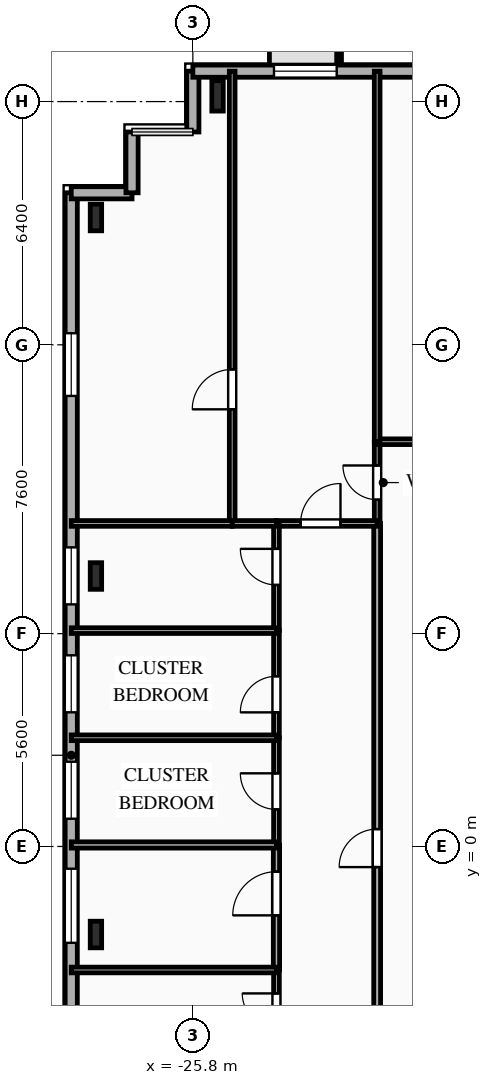
"""IFC4 building model, lengths in metres.
Left out: names, types, materials, properties, quantities, classifications, styles, units other than length and angle.
Written with IfcOpenShell. Run it as: python <this file> out.ifc"""

import sys

from ifc_helpers import new_model, si_unit, direction, frame, frame_2d, origin, origin_2d, place, context, subcontext, project, spatial, rectangle, i_section, extrude, element, fill, save


model = new_model("IFC4")
c1 = context("Model", 3, precision=1e-05, world=origin(), true_north=direction((0.0, 1.0)))
c2 = subcontext(c1, "Body", "Model", "MODEL_VIEW")
j1 = project(units=[si_unit("LENGTHUNIT", "METRE"), si_unit("PLANEANGLEUNIT", "RADIAN")], contexts=[c1])
p1 = place(None, origin())
s1 = spatial("IfcSite", under=j1, at=p1, CompositionType="ELEMENT")
p2 = place(p1, origin())
s2 = spatial("IfcBuilding", under=s1, at=p2, CompositionType="ELEMENT")
p3 = place(p2, frame((0.0, 0.0, 137.7)))
s3 = spatial("IfcBuildingStorey", under=s2, at=p3, CompositionType="ELEMENT", Elevation=137.7)
p4 = place(p3, frame((-25.15, 19.75, 0.0), z_axis=(0.0, 0.0, 1.0), x_axis=(1.0, 0.0, 0.0)))
e1 = element("IfcColumn", 1, at=p4, inside=s3, PredefinedType="COLUMN", context=c2, shape_type="SweptSolid", body=[
    extrude(i_section(OverallWidth=0.3, OverallDepth=0.8, WebThickness=0.018, FlangeThickness=0.033, FilletRadius=0.03, at=origin_2d()), origin(), (0.0, 0.0, 1.0), 3.35),
])
for number, where, z_axis, x_axis in (
    (2, (-28.35, 16.55, 0.0), (0.0, 0.0, 1.0), (1.0, 0.0, 0.0)),
    (3, (-28.35, 7.117, 0.0), (0.0, 0.0, 1.0), (1.0, 0.0, 0.0)),
    (4, (-28.35, -2.317, 0.0), (0.0, 0.0, 1.0), (1.0, 0.0, 0.0)),
):
    element("IfcColumn", number, at=place(p3, frame(where, z_axis=z_axis, x_axis=x_axis)), inside=s3, PredefinedType="COLUMN", context=c2, shape_type="SweptSolid", body=[
        extrude(i_section(OverallWidth=0.3, OverallDepth=0.7, WebThickness=0.017, FlangeThickness=0.032, FilletRadius=0.027, at=origin_2d()), origin(), (0.0, 0.0, 1.0), 3.35),
    ])
p5 = place(p3, frame((-29.0, -12.4, 0.0), z_axis=(0.0, 0.0, 1.0), x_axis=(0.0, 1.0, 0.0)))
e5 = element("IfcWall", 5, at=p5, inside=s3, PredefinedType="SOLIDWALL", context=c2, shape_type="SweptSolid", body=[
    extrude(rectangle(XDim=29.6, YDim=0.32, at=frame_2d((14.8, 0.0))), origin(), (0.0, 0.0, 1.0), 3.04),
])
p6 = place(p5, frame((2.855, 0.0, 0.85)))
e6 = element("IfcOpeningElement", 6, at=p6, cuts=e5, PredefinedType="OPENING", context=c2, shape_type="SweptSolid", body=[
    extrude(rectangle(XDim=1.65, YDim=1.85, at=frame_2d((0.825, 0.925))), frame((0.0, 0.17, 0.0), z_axis=(0.0, -1.0, 0.0), x_axis=(1.0, 0.0, 0.0)), (0.0, 0.0, 1.0), 0.34),
])
p7 = place(p5, frame((9.865, 0.0, 0.85)))
e7 = element("IfcOpeningElement", 7, at=p7, cuts=e5, PredefinedType="OPENING", context=c2, shape_type="SweptSolid", body=[
    extrude(rectangle(XDim=1.95, YDim=1.85, at=frame_2d((0.975, 0.925))), frame((0.0, 0.17, 0.0), z_axis=(0.0, -1.0, 0.0), x_axis=(1.0, 0.0, 0.0)), (0.0, 0.0, 1.0), 0.34),
])
p8 = place(p5, frame((13.13, 0.0, 0.85)))
e8 = element("IfcOpeningElement", 8, at=p8, cuts=e5, PredefinedType="OPENING", context=c2, shape_type="SweptSolid", body=[
    extrude(rectangle(XDim=1.5, YDim=1.85, at=frame_2d((0.75, 0.925))), frame((0.0, 0.17, 0.0), z_axis=(0.0, -1.0, 0.0), x_axis=(1.0, 0.0, 0.0)), (0.0, 0.0, 1.0), 0.34),
])
p9 = place(p5, frame((15.93, 0.0, 0.85)))
e9 = element("IfcOpeningElement", 9, at=p9, cuts=e5, PredefinedType="OPENING", context=c2, shape_type="SweptSolid", body=[
    extrude(rectangle(XDim=1.5, YDim=1.85, at=frame_2d((0.75, 0.925))), frame((0.0, 0.17, 0.0), z_axis=(0.0, -1.0, 0.0), x_axis=(1.0, 0.0, 0.0)), (0.0, 0.0, 1.0), 0.34),
])
p10 = place(p5, frame((18.77, 0.0, 0.85)))
e10 = element("IfcOpeningElement", 10, at=p10, cuts=e5, PredefinedType="OPENING", context=c2, shape_type="SweptSolid", body=[
    extrude(rectangle(XDim=1.5, YDim=1.85, at=frame_2d((0.75, 0.925))), frame((0.0, 0.17, 0.0), z_axis=(0.0, -1.0, 0.0), x_axis=(1.0, 0.0, 0.0)), (0.0, 0.0, 1.0), 0.34),
])
p11 = place(p5, frame((24.255, 0.0, 0.85)))
e11 = element("IfcOpeningElement", 11, at=p11, cuts=e5, PredefinedType="OPENING", context=c2, shape_type="SweptSolid", body=[
    extrude(rectangle(XDim=1.65, YDim=1.85, at=frame_2d((0.825, 0.925))), frame((0.0, 0.17, 0.0), z_axis=(0.0, -1.0, 0.0), x_axis=(1.0, 0.0, 0.0)), (0.0, 0.0, 1.0), 0.34),
])
for number, where, z_axis, x_axis in (
    (12, (-29.0, 17.2, 0.0), (0.0, 0.0, 1.0), (1.0, 0.0, 0.0)),
    (13, (-27.4, 17.2, 0.0), (0.0, 0.0, 1.0), (0.0, 1.0, 0.0)),
):
    element("IfcWall", number, at=place(p3, frame(where, z_axis=z_axis, x_axis=x_axis)), inside=s3, PredefinedType="SOLIDWALL", context=c2, shape_type="SweptSolid", body=[
        extrude(rectangle(XDim=1.6, YDim=0.32, at=frame_2d((0.8, 0.0))), origin(), (0.0, 0.0, 1.0), 3.04),
    ])
p12 = place(p3, frame((-25.8, 18.8, 0.0), z_axis=(0.0, 0.0, 1.0), x_axis=(0.0, 1.0, 0.0)))
e14 = element("IfcWall", 14, at=p12, inside=s3, PredefinedType="SOLIDWALL", context=c2, shape_type="SweptSolid", body=[
    extrude(rectangle(XDim=1.6, YDim=0.32, at=frame_2d((0.8, 0.0))), origin(), (0.0, 0.0, 1.0), 3.04),
])
p13 = place(p3, frame((-25.8, 20.4, 0.0), z_axis=(0.0, 0.0, 1.0), x_axis=(1.0, 0.0, 0.0)))
e15 = element("IfcWall", 15, at=p13, inside=s3, PredefinedType="SOLIDWALL", context=c2, shape_type="SweptSolid", body=[
    extrude(rectangle(XDim=49.6, YDim=0.32, at=frame_2d((24.8, 0.0))), origin(), (0.0, 0.0, 1.0), 3.04),
])
p14 = place(p13, frame((2.135, 0.0, 0.85)))
e16 = element("IfcOpeningElement", 16, at=p14, cuts=e15, PredefinedType="OPENING", context=c2, shape_type="SweptSolid", body=[
    extrude(rectangle(XDim=1.65, YDim=1.85, at=frame_2d((0.825, 0.925))), frame((0.0, 0.17, 0.0), z_axis=(0.0, -1.0, 0.0), x_axis=(1.0, 0.0, 0.0)), (0.0, 0.0, 1.0), 0.34),
])
p15 = place(p13, frame((6.706, 0.0, 0.85)))
e17 = element("IfcOpeningElement", 17, at=p15, cuts=e15, PredefinedType="OPENING", context=c2, shape_type="SweptSolid", body=[
    extrude(rectangle(XDim=1.65, YDim=1.85, at=frame_2d((0.825, 0.925))), frame((0.0, 0.17, 0.0), z_axis=(0.0, -1.0, 0.0), x_axis=(1.0, 0.0, 0.0)), (0.0, 0.0, 1.0), 0.34),
])
p16 = place(p13, frame((14.81, 0.0, 0.85)))
e18 = element("IfcOpeningElement", 18, at=p16, cuts=e15, PredefinedType="OPENING", context=c2, shape_type="SweptSolid", body=[
    extrude(rectangle(XDim=1.5, YDim=1.85, at=frame_2d((0.75, 0.925))), frame((0.0, 0.17, 0.0), z_axis=(0.0, -1.0, 0.0), x_axis=(1.0, 0.0, 0.0)), (0.0, 0.0, 1.0), 0.34),
])
p17 = place(p13, frame((19.26, 0.0, 0.85)))
e19 = element("IfcOpeningElement", 19, at=p17, cuts=e15, PredefinedType="OPENING", context=c2, shape_type="SweptSolid", body=[
    extrude(rectangle(XDim=2.2, YDim=1.85, at=frame_2d((1.1, 0.925))), frame((0.0, 0.17, 0.0), z_axis=(0.0, -1.0, 0.0), x_axis=(1.0, 0.0, 0.0)), (0.0, 0.0, 1.0), 0.34),
])
p18 = place(p13, frame((25.26, 0.0, 0.85)))
e20 = element("IfcOpeningElement", 20, at=p18, cuts=e15, PredefinedType="OPENING", context=c2, shape_type="SweptSolid", body=[
    extrude(rectangle(XDim=2.2, YDim=1.85, at=frame_2d((1.1, 0.925))), frame((0.0, 0.17, 0.0), z_axis=(0.0, -1.0, 0.0), x_axis=(1.0, 0.0, 0.0)), (0.0, 0.0, 1.0), 0.34),
])
p19 = place(p13, frame((30.4, 0.0, 0.85)))
e21 = element("IfcOpeningElement", 21, at=p19, cuts=e15, PredefinedType="OPENING", context=c2, shape_type="SweptSolid", body=[
    extrude(rectangle(XDim=2.2, YDim=1.85, at=frame_2d((1.1, 0.925))), frame((0.0, 0.17, 0.0), z_axis=(0.0, -1.0, 0.0), x_axis=(1.0, 0.0, 0.0)), (0.0, 0.0, 1.0), 0.34),
])
p20 = place(p13, frame((37.18, 0.0, 0.85)))
e22 = element("IfcOpeningElement", 22, at=p20, cuts=e15, PredefinedType="OPENING", context=c2, shape_type="SweptSolid", body=[
    extrude(rectangle(XDim=2.2, YDim=1.85, at=frame_2d((1.1, 0.925))), frame((0.0, 0.17, 0.0), z_axis=(0.0, -1.0, 0.0), x_axis=(1.0, 0.0, 0.0)), (0.0, 0.0, 1.0), 0.34),
])
p21 = place(p13, frame((43.215, 0.0, 0.85)))
e23 = element("IfcOpeningElement", 23, at=p21, cuts=e15, PredefinedType="OPENING", context=c2, shape_type="SweptSolid", body=[
    extrude(rectangle(XDim=1.65, YDim=1.85, at=frame_2d((0.825, 0.925))), frame((0.0, 0.17, 0.0), z_axis=(0.0, -1.0, 0.0), x_axis=(1.0, 0.0, 0.0)), (0.0, 0.0, 1.0), 0.34),
])
p22 = place(p13, frame((47.45, 0.0, 0.85)))
e24 = element("IfcOpeningElement", 24, at=p22, cuts=e15, PredefinedType="OPENING", context=c2, shape_type="SweptSolid", body=[
    extrude(rectangle(XDim=1.1, YDim=1.85, at=frame_2d((0.55, 0.925))), frame((0.0, 0.17, 0.0), z_axis=(0.0, -1.0, 0.0), x_axis=(1.0, 0.0, 0.0)), (0.0, 0.0, 1.0), 0.34),
])
p23 = place(p3, frame((-20.95, 8.5, 0.0), z_axis=(0.0, 0.0, 1.0), x_axis=(0.0, 1.0, 0.0)))
e25 = element("IfcWall", 25, at=p23, inside=s3, PredefinedType="PARTITIONING", context=c2, shape_type="SweptSolid", body=[
    extrude(rectangle(XDim=2.15, YDim=0.15, at=frame_2d((1.075, 0.0))), origin(), (0.0, 0.0, 1.0), 3.04),
])
p24 = place(p23, frame((0.625, 0.0, 0.0)))
e26 = element("IfcOpeningElement", 26, at=p24, cuts=e25, PredefinedType="OPENING", context=c2, shape_type="SweptSolid", body=[
    extrude(rectangle(XDim=0.9, YDim=2.1, at=frame_2d((0.45, 1.05))), frame((0.0, 0.085, 0.0), z_axis=(0.0, -1.0, 0.0), x_axis=(1.0, 0.0, 0.0)), (0.0, 0.0, 1.0), 0.17),
])
p25 = place(p3, frame((-20.95, 10.65, 0.0), z_axis=(0.0, 0.0, 1.0), x_axis=(1.0, 0.0, 0.0)))
e27 = element("IfcWall", 27, at=p25, inside=s3, PredefinedType="PARTITIONING", context=c2, shape_type="SweptSolid", body=[
    extrude(rectangle(XDim=6.486, YDim=0.15, at=frame_2d((3.243, 0.0))), origin(), (0.0, 0.0, 1.0), 3.04),
])
p26 = place(p25, frame((4.322, 0.0, 0.0)))
e28 = element("IfcOpeningElement", 28, at=p26, cuts=e27, PredefinedType="OPENING", context=c2, shape_type="SweptSolid", body=[
    extrude(rectangle(XDim=1.05, YDim=2.15, at=frame_2d((0.525, 1.075))), frame((0.0, 0.085, 0.0), z_axis=(0.0, -1.0, 0.0), x_axis=(1.0, 0.0, 0.0)), (0.0, 0.0, 1.0), 0.17),
])
p27 = place(p3, frame((-20.95, -5.6, 0.0), z_axis=(0.0, 0.0, 1.0), x_axis=(0.0, 1.0, 0.0)))
e29 = element("IfcWall", 29, at=p27, inside=s3, PredefinedType="PARTITIONING", context=c2, shape_type="SweptSolid", body=[
    extrude(rectangle(XDim=14.1, YDim=0.18, at=frame_2d((7.05, 0.0))), origin(), (0.0, 0.0, 1.0), 3.04),
])
p28 = place(p27, frame((5.058, 0.0, 0.0)))
e30 = element("IfcOpeningElement", 30, at=p28, cuts=e29, PredefinedType="OPENING", context=c2, shape_type="SweptSolid", body=[
    extrude(rectangle(XDim=1.0, YDim=2.15, at=frame_2d((0.5, 1.075))), frame((0.0, 0.1, 0.0), z_axis=(0.0, -1.0, 0.0), x_axis=(1.0, 0.0, 0.0)), (0.0, 0.0, 1.0), 0.2),
])
p29 = place(p3, frame((-23.6, 8.5, 0.0), z_axis=(0.0, 0.0, 1.0), x_axis=(1.0, 0.0, 0.0)))
e31 = element("IfcWall", 31, at=p29, inside=s3, PredefinedType="PARTITIONING", context=c2, shape_type="SweptSolid", body=[
    extrude(rectangle(XDim=2.65, YDim=0.15, at=frame_2d((1.325, 0.0))), origin(), (0.0, 0.0, 1.0), 3.04),
])
p30 = place(p29, frame((0.635, 0.0, 0.0)))
e32 = element("IfcOpeningElement", 32, at=p30, cuts=e31, PredefinedType="OPENING", context=c2, shape_type="SweptSolid", body=[
    extrude(rectangle(XDim=1.05, YDim=2.15, at=frame_2d((0.525, 1.075))), frame((0.0, 0.085, 0.0), z_axis=(0.0, -1.0, 0.0), x_axis=(1.0, 0.0, 0.0)), (0.0, 0.0, 1.0), 0.17),
])
p31 = place(p3, frame((-23.6, -5.6, 0.0), z_axis=(0.0, 0.0, 1.0), x_axis=(0.0, 1.0, 0.0)))
e33 = element("IfcWall", 33, at=p31, inside=s3, PredefinedType="PLUMBINGWALL", context=c2, shape_type="SweptSolid", body=[
    extrude(rectangle(XDim=2.35, YDim=0.15, at=frame_2d((1.175, 0.0))), origin(), (0.0, 0.0, 1.0), 2.695),
])
p32 = place(p31, frame((0.834, 0.0, 0.0)))
e34 = element("IfcOpeningElement", 34, at=p32, cuts=e33, PredefinedType="OPENING", context=c2, shape_type="SweptSolid", body=[
    extrude(rectangle(XDim=0.9, YDim=2.1, at=frame_2d((0.45, 1.05))), frame((0.0, 0.085, 0.0), z_axis=(0.0, -1.0, 0.0), x_axis=(1.0, 0.0, 0.0)), (0.0, 0.0, 1.0), 0.17),
])
p33 = place(p3, frame((-23.6, -3.25, 0.0), z_axis=(0.0, 0.0, 1.0), x_axis=(0.0, 1.0, 0.0)))
e35 = element("IfcWall", 35, at=p33, inside=s3, PredefinedType="PARTITIONING", context=c2, shape_type="SweptSolid", body=[
    extrude(rectangle(XDim=3.29, YDim=0.165, at=frame_2d((1.645, 0.0))), origin(), (0.0, 0.0, 1.0), 2.695),
])
p34 = place(p33, frame((1.438, 0.0, 0.0)))
e36 = element("IfcOpeningElement", 36, at=p34, cuts=e35, PredefinedType="OPENING", context=c2, shape_type="SweptSolid", body=[
    extrude(rectangle(XDim=1.15, YDim=2.15, at=frame_2d((0.575, 1.075))), frame((0.0, 0.093, 0.0), z_axis=(0.0, -1.0, 0.0), x_axis=(1.0, 0.0, 0.0)), (0.0, 0.0, 1.0), 0.185),
])
p35 = place(p3, frame((-23.6, 0.04, 0.0), z_axis=(0.0, 0.0, 1.0), x_axis=(0.0, 1.0, 0.0)))
e37 = element("IfcWall", 37, at=p35, inside=s3, PredefinedType="PARTITIONING", context=c2, shape_type="SweptSolid", body=[
    extrude(rectangle(XDim=2.82, YDim=0.15, at=frame_2d((1.41, 0.0))), origin(), (0.0, 0.0, 1.0), 2.695),
])
p36 = place(p35, frame((0.935, 0.0, 0.0)))
e38 = element("IfcOpeningElement", 38, at=p36, cuts=e37, PredefinedType="OPENING", context=c2, shape_type="SweptSolid", body=[
    extrude(rectangle(XDim=0.95, YDim=2.1, at=frame_2d((0.475, 1.05))), frame((0.0, 0.085, 0.0), z_axis=(0.0, -1.0, 0.0), x_axis=(1.0, 0.0, 0.0)), (0.0, 0.0, 1.0), 0.17),
])
p37 = place(p3, frame((-23.6, 2.86, 0.0), z_axis=(0.0, 0.0, 1.0), x_axis=(0.0, 1.0, 0.0)))
e39 = element("IfcWall", 39, at=p37, inside=s3, PredefinedType="PARTITIONING", context=c2, shape_type="SweptSolid", body=[
    extrude(rectangle(XDim=2.82, YDim=0.15, at=frame_2d((1.41, 0.0))), origin(), (0.0, 0.0, 1.0), 2.695),
])
p38 = place(p37, frame((0.669, 0.0, 0.0)))
e40 = element("IfcOpeningElement", 40, at=p38, cuts=e39, PredefinedType="OPENING", context=c2, shape_type="SweptSolid", body=[
    extrude(rectangle(XDim=0.95, YDim=2.1, at=frame_2d((0.475, 1.05))), frame((0.0, 0.085, 0.0), z_axis=(0.0, -1.0, 0.0), x_axis=(1.0, 0.0, 0.0)), (0.0, 0.0, 1.0), 0.17),
])
p39 = place(p3, frame((-23.6, 5.68, 0.0), z_axis=(0.0, 0.0, 1.0), x_axis=(0.0, 1.0, 0.0)))
e41 = element("IfcWall", 41, at=p39, inside=s3, PredefinedType="PARTITIONING", context=c2, shape_type="SweptSolid", body=[
    extrude(rectangle(XDim=2.82, YDim=0.15, at=frame_2d((1.41, 0.0))), origin(), (0.0, 0.0, 1.0), 2.695),
])
p40 = place(p39, frame((1.201, 0.0, 0.0)))
e42 = element("IfcOpeningElement", 42, at=p40, cuts=e41, PredefinedType="OPENING", context=c2, shape_type="SweptSolid", body=[
    extrude(rectangle(XDim=0.95, YDim=2.1, at=frame_2d((0.475, 1.05))), frame((0.0, 0.085, 0.0), z_axis=(0.0, -1.0, 0.0), x_axis=(1.0, 0.0, 0.0)), (0.0, 0.0, 1.0), 0.17),
])
p41 = place(p3, frame((-24.765, 8.5, 0.0), z_axis=(0.0, 0.0, 1.0), x_axis=(0.0, 1.0, 0.0)))
e43 = element("IfcWall", 43, at=p41, inside=s3, PredefinedType="PARTITIONING", context=c2, shape_type="SweptSolid", body=[
    extrude(rectangle(XDim=11.9, YDim=0.15, at=frame_2d((5.95, 0.0))), origin(), (0.0, 0.0, 1.0), 3.04),
])
p42 = place(p41, frame((3.002, 0.0, 0.0)))
e44 = element("IfcOpeningElement", 44, at=p42, cuts=e43, PredefinedType="OPENING", context=c2, shape_type="SweptSolid", body=[
    extrude(rectangle(XDim=1.05, YDim=2.15, at=frame_2d((0.525, 1.075))), frame((0.0, 0.085, 0.0), z_axis=(0.0, -1.0, 0.0), x_axis=(1.0, 0.0, 0.0)), (0.0, 0.0, 1.0), 0.17),
])
p43 = place(p3, frame((-23.6, 8.5, 0.0), z_axis=(0.0, 0.0, 1.0), x_axis=(-1.0, 0.0, 0.0)))
e45 = element("IfcWall", 45, at=p43, inside=s3, PredefinedType="PARTITIONING", context=c2, shape_type="SweptSolid", body=[
    extrude(rectangle(XDim=1.165, YDim=0.15, at=frame_2d((0.583, 0.0))), origin(), (0.0, 0.0, 1.0), 3.04),
])
p44 = place(p3, frame((-20.95, 20.4, 0.0), z_axis=(0.0, 0.0, 1.0), x_axis=(0.0, -1.0, 0.0)))
e46 = element("IfcWall", 46, at=p44, inside=s3, PredefinedType="PARTITIONING", context=c2, shape_type="SweptSolid", body=[
    extrude(rectangle(XDim=9.75, YDim=0.15, at=frame_2d((4.875, 0.0))), origin(), (0.0, 0.0, 1.0), 3.04),
])
p45 = place(p3, frame((-24.765, 8.5, 0.0), z_axis=(0.0, 0.0, 1.0), x_axis=(-1.0, 0.0, 0.0)))
e47 = element("IfcWall", 47, at=p45, inside=s3, PredefinedType="PARTITIONING", context=c2, shape_type="SweptSolid", body=[
    extrude(rectangle(XDim=4.235, YDim=0.15, at=frame_2d((2.118, 0.0))), origin(), (0.0, 0.0, 1.0), 3.04),
])
p46 = place(p3, frame((-29.0, -3.25, 0.0), z_axis=(0.0, 0.0, 1.0), x_axis=(1.0, 0.0, 0.0)))
e48 = element("IfcWall", 48, at=p46, inside=s3, PredefinedType="PLUMBINGWALL", context=c2, shape_type="SweptSolid", body=[
    extrude(rectangle(XDim=5.4, YDim=0.15, at=frame_2d((2.7, 0.0))), origin(), (0.0, 0.0, 1.0), 3.04),
])
p47 = place(p3, frame((-29.0, 0.04, 0.0), z_axis=(0.0, 0.0, 1.0), x_axis=(1.0, 0.0, 0.0)))
e49 = element("IfcWall", 49, at=p47, inside=s3, PredefinedType="PARTITIONING", context=c2, shape_type="SweptSolid", body=[
    extrude(rectangle(XDim=5.4, YDim=0.165, at=frame_2d((2.7, 0.0))), origin(), (0.0, 0.0, 1.0), 3.04),
])
for number, where, z_axis, x_axis in (
    (50, (-29.0, 2.86, 0.0), (0.0, 0.0, 1.0), (1.0, 0.0, 0.0)),
    (51, (-29.0, 5.68, 0.0), (0.0, 0.0, 1.0), (1.0, 0.0, 0.0)),
):
    element("IfcWall", number, at=place(p3, frame(where, z_axis=z_axis, x_axis=x_axis)), inside=s3, PredefinedType="PARTITIONING", context=c2, shape_type="SweptSolid", body=[
        extrude(rectangle(XDim=5.4, YDim=0.15, at=frame_2d((2.7, 0.0))), origin(), (0.0, 0.0, 1.0), 3.04),
    ])
p48 = place(p7, origin())
e52 = element("IfcWindow", 52, at=p48, inside=s3, PartitioningType="SINGLE_PANEL", PredefinedType="WINDOW", context=c2, shape_type="SweptSolid", body=[
    extrude(rectangle(XDim=1.95, YDim=1.85, at=frame_2d((0.975, 0.925))), frame((0.0, 0.03, 0.0), z_axis=(0.0, -1.0, 0.0), x_axis=(1.0, 0.0, 0.0)), (0.0, 0.0, 1.0), 0.06),
])
fill(e7, e52)
p49 = place(p8, origin())
e53 = element("IfcWindow", 53, at=p49, inside=s3, PartitioningType="SINGLE_PANEL", PredefinedType="WINDOW", context=c2, shape_type="SweptSolid", body=[
    extrude(rectangle(XDim=1.5, YDim=1.85, at=frame_2d((0.75, 0.925))), frame((0.0, 0.03, 0.0), z_axis=(0.0, -1.0, 0.0), x_axis=(1.0, 0.0, 0.0)), (0.0, 0.0, 1.0), 0.06),
])
fill(e8, e53)
p50 = place(p9, origin())
e54 = element("IfcWindow", 54, at=p50, inside=s3, PartitioningType="SINGLE_PANEL", PredefinedType="WINDOW", context=c2, shape_type="SweptSolid", body=[
    extrude(rectangle(XDim=1.5, YDim=1.85, at=frame_2d((0.75, 0.925))), frame((0.0, 0.03, 0.0), z_axis=(0.0, -1.0, 0.0), x_axis=(1.0, 0.0, 0.0)), (0.0, 0.0, 1.0), 0.06),
])
fill(e9, e54)
p51 = place(p10, origin())
e55 = element("IfcWindow", 55, at=p51, inside=s3, PartitioningType="SINGLE_PANEL", PredefinedType="WINDOW", context=c2, shape_type="SweptSolid", body=[
    extrude(rectangle(XDim=1.5, YDim=1.85, at=frame_2d((0.75, 0.925))), frame((0.0, 0.03, 0.0), z_axis=(0.0, -1.0, 0.0), x_axis=(1.0, 0.0, 0.0)), (0.0, 0.0, 1.0), 0.06),
])
fill(e10, e55)
p52 = place(p11, origin())
e56 = element("IfcWindow", 56, at=p52, inside=s3, PartitioningType="SINGLE_PANEL", PredefinedType="WINDOW", context=c2, shape_type="SweptSolid", body=[
    extrude(rectangle(XDim=1.65, YDim=1.85, at=frame_2d((0.825, 0.925))), frame((0.0, 0.03, 0.0), z_axis=(0.0, -1.0, 0.0), x_axis=(1.0, 0.0, 0.0)), (0.0, 0.0, 1.0), 0.06),
])
fill(e11, e56)
p53 = place(p14, origin())
e57 = element("IfcWindow", 57, at=p53, inside=s3, PartitioningType="SINGLE_PANEL", PredefinedType="WINDOW", context=c2, shape_type="SweptSolid", body=[
    extrude(rectangle(XDim=1.65, YDim=1.85, at=frame_2d((0.825, 0.925))), frame((0.0, 0.03, 0.0), z_axis=(0.0, -1.0, 0.0), x_axis=(1.0, 0.0, 0.0)), (0.0, 0.0, 1.0), 0.06),
])
fill(e16, e57)
p54 = place(p24, origin())
e58 = element("IfcDoor", 58, at=p54, inside=s3, OperationType="SINGLE_SWING_RIGHT", PredefinedType="DOOR", context=c2, shape_type="SweptSolid", body=[
    extrude(rectangle(XDim=0.9, YDim=2.1, at=frame_2d((0.45, 1.05))), frame((0.0, 0.025, 0.0), z_axis=(0.0, -1.0, 0.0), x_axis=(1.0, 0.0, 0.0)), (0.0, 0.0, 1.0), 0.05),
])
fill(e26, e58)
p55 = place(p28, origin())
e59 = element("IfcDoor", 59, at=p55, inside=s3, OperationType="SINGLE_SWING_LEFT", PredefinedType="DOOR", context=c2, shape_type="SweptSolid", body=[
    extrude(rectangle(XDim=1.0, YDim=2.15, at=frame_2d((0.5, 1.075))), frame((0.0, 0.025, 0.0), z_axis=(0.0, -1.0, 0.0), x_axis=(1.0, 0.0, 0.0)), (0.0, 0.0, 1.0), 0.05),
])
fill(e30, e59)
p56 = place(p30, origin())
e60 = element("IfcDoor", 60, at=p56, inside=s3, OperationType="SINGLE_SWING_RIGHT", PredefinedType="DOOR", context=c2, shape_type="SweptSolid", body=[
    extrude(rectangle(XDim=1.05, YDim=2.15, at=frame_2d((0.525, 1.075))), frame((0.0, 0.025, 0.0), z_axis=(0.0, -1.0, 0.0), x_axis=(1.0, 0.0, 0.0)), (0.0, 0.0, 1.0), 0.05),
])
fill(e32, e60)
p57 = place(p32, origin())
e61 = element("IfcDoor", 61, at=p57, inside=s3, OperationType="SINGLE_SWING_RIGHT", PredefinedType="DOOR", context=c2, shape_type="SweptSolid", body=[
    extrude(rectangle(XDim=0.9, YDim=2.1, at=frame_2d((0.45, 1.05))), frame((0.0, 0.025, 0.0), z_axis=(0.0, -1.0, 0.0), x_axis=(1.0, 0.0, 0.0)), (0.0, 0.0, 1.0), 0.05),
])
fill(e34, e61)
p58 = place(p34, origin())
e62 = element("IfcDoor", 62, at=p58, inside=s3, OperationType="SINGLE_SWING_LEFT", PredefinedType="DOOR", context=c2, shape_type="SweptSolid", body=[
    extrude(rectangle(XDim=1.15, YDim=2.15, at=frame_2d((0.575, 1.075))), frame((0.0, 0.025, 0.0), z_axis=(0.0, -1.0, 0.0), x_axis=(1.0, 0.0, 0.0)), (0.0, 0.0, 1.0), 0.05),
])
fill(e36, e62)
p59 = place(p36, origin())
e63 = element("IfcDoor", 63, at=p59, inside=s3, OperationType="SINGLE_SWING_RIGHT", PredefinedType="DOOR", context=c2, shape_type="SweptSolid", body=[
    extrude(rectangle(XDim=0.95, YDim=2.1, at=frame_2d((0.475, 1.05))), frame((0.0, 0.025, 0.0), z_axis=(0.0, -1.0, 0.0), x_axis=(1.0, 0.0, 0.0)), (0.0, 0.0, 1.0), 0.05),
])
fill(e38, e63)
p60 = place(p38, origin())
e64 = element("IfcDoor", 64, at=p60, inside=s3, OperationType="SINGLE_SWING_LEFT", PredefinedType="DOOR", context=c2, shape_type="SweptSolid", body=[
    extrude(rectangle(XDim=0.95, YDim=2.1, at=frame_2d((0.475, 1.05))), frame((0.0, 0.025, 0.0), z_axis=(0.0, -1.0, 0.0), x_axis=(1.0, 0.0, 0.0)), (0.0, 0.0, 1.0), 0.05),
])
fill(e40, e64)
p61 = place(p40, origin())
e65 = element("IfcDoor", 65, at=p61, inside=s3, OperationType="SINGLE_SWING_RIGHT", PredefinedType="DOOR", context=c2, shape_type="SweptSolid", body=[
    extrude(rectangle(XDim=0.95, YDim=2.1, at=frame_2d((0.475, 1.05))), frame((0.0, 0.025, 0.0), z_axis=(0.0, -1.0, 0.0), x_axis=(1.0, 0.0, 0.0)), (0.0, 0.0, 1.0), 0.05),
])
fill(e42, e65)
p62 = place(p42, origin())
e66 = element("IfcDoor", 66, at=p62, inside=s3, OperationType="SINGLE_SWING_LEFT", PredefinedType="DOOR", context=c2, shape_type="SweptSolid", body=[
    extrude(rectangle(XDim=1.05, YDim=2.15, at=frame_2d((0.525, 1.075))), frame((0.0, 0.025, 0.0), z_axis=(0.0, -1.0, 0.0), x_axis=(1.0, 0.0, 0.0)), (0.0, 0.0, 1.0), 0.05),
])
fill(e44, e66)
save(model, sys.argv[1])
